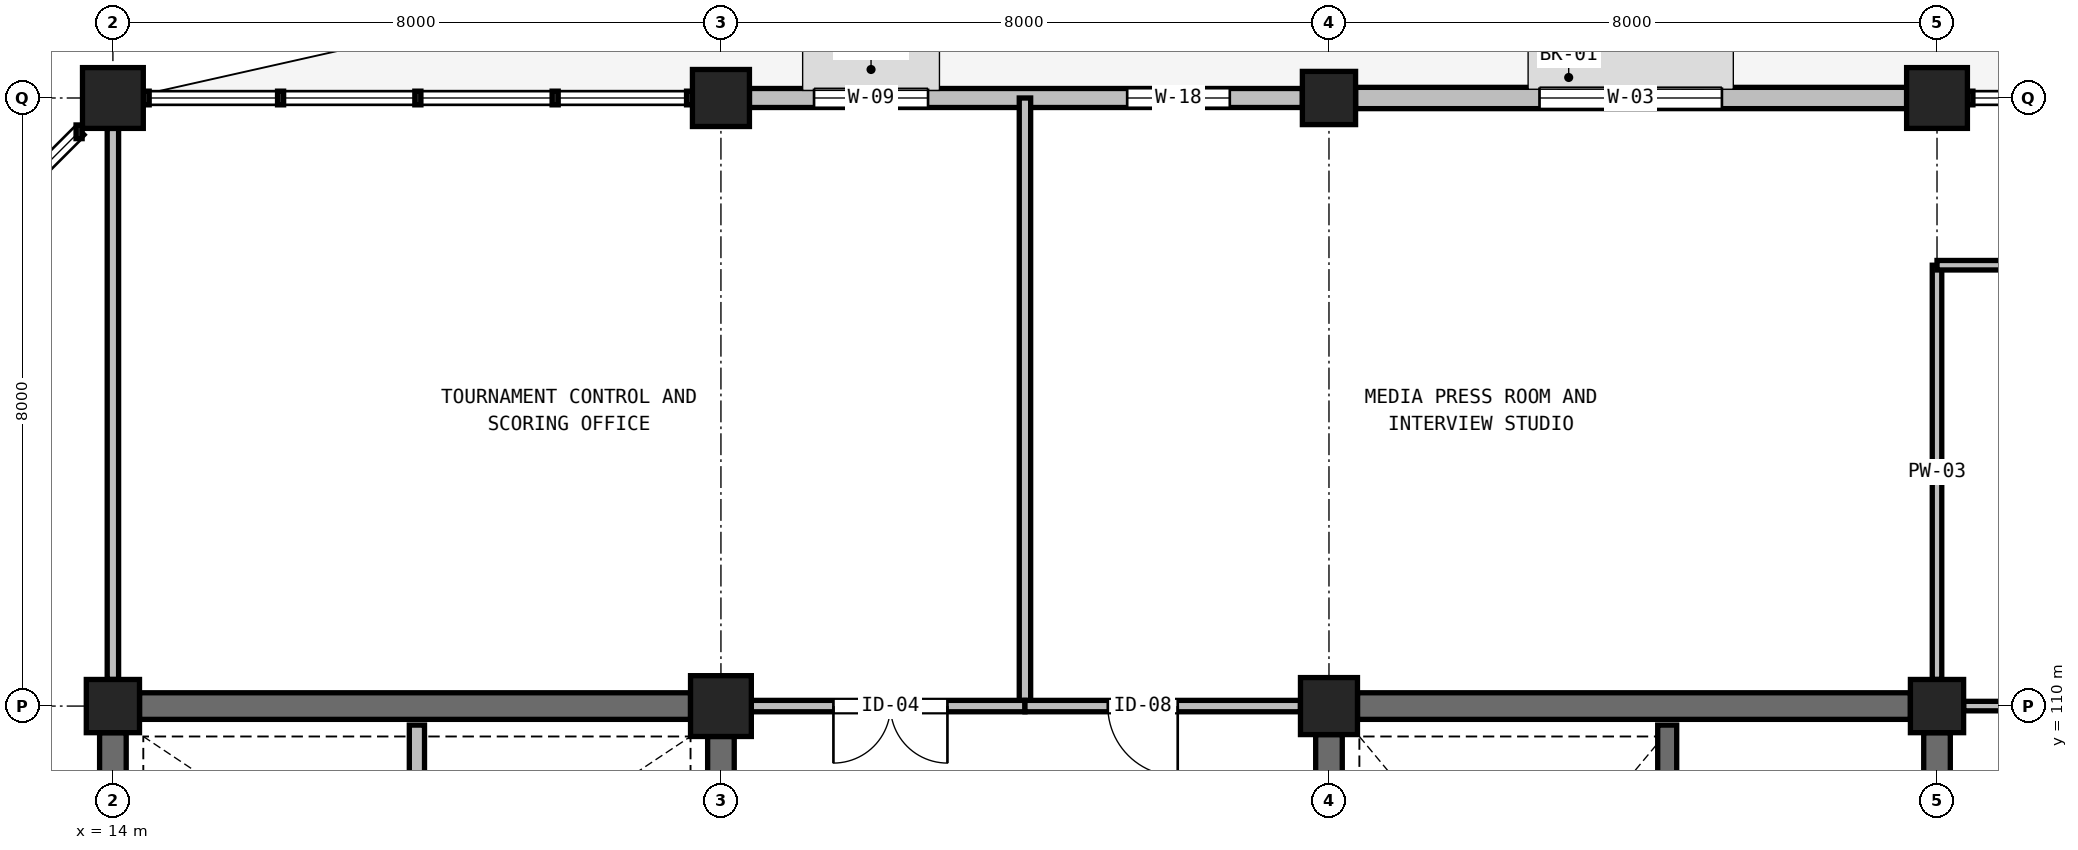
"""IFC4 building model, lengths in metres.
Left out: names, types, materials, properties, quantities, classifications, styles, units other than length and angle.
Written with IfcOpenShell. Run it as: python <this file> out.ifc"""

import sys

from ifc_helpers import new_model, si_unit, direction, frame, frame_2d, origin, origin_2d, place, context, subcontext, project, spatial, rectangle, extrude, element, fill, save


model = new_model("IFC4")
c1 = context("Model", 3, precision=1e-05, world=origin(), true_north=direction((0.0, 1.0)))
c2 = subcontext(c1, "Body", "Model", "MODEL_VIEW")
j1 = project(units=[si_unit("LENGTHUNIT", "METRE"), si_unit("PLANEANGLEUNIT", "RADIAN")], contexts=[c1])
p1 = place(None, origin())
s1 = spatial("IfcSite", under=j1, at=p1, CompositionType="ELEMENT")
p2 = place(p1, origin())
s2 = spatial("IfcBuilding", under=s1, at=p2, CompositionType="ELEMENT")
p3 = place(p2, frame((0.0, 0.0, 5.4)))
s3 = spatial("IfcBuildingStorey", under=s2, at=p3, CompositionType="ELEMENT", Elevation=5.4)
p4 = place(p3, frame((14.0, 110.0, 0.0), z_axis=(0.0, 0.0, 1.0), x_axis=(1.0, 0.0, 0.0)))
e1 = element("IfcColumn", 1, at=p4, inside=s3, PredefinedType="COLUMN", context=c2, shape_type="SweptSolid", body=[
    extrude(rectangle(XDim=0.7, YDim=0.7, at=origin_2d()), origin(), (0.0, 0.0, 1.0), 5.4),
])
for number, where, z_axis, x_axis in (
    (2, (14.0, 118.0, 0.0), (0.0, 0.0, 1.0), (1.0, 0.0, 0.0)),
    (3, (22.0, 110.0, 0.0), (0.0, 0.0, 1.0), (1.0, 0.0, 0.0)),
):
    element("IfcColumn", number, at=place(p3, frame(where, z_axis=z_axis, x_axis=x_axis)), inside=s3, PredefinedType="COLUMN", context=c2, shape_type="SweptSolid", body=[
        extrude(rectangle(XDim=0.8, YDim=0.8, at=origin_2d()), origin(), (0.0, 0.0, 1.0), 5.4),
    ])
for number, where, z_axis, x_axis in (
    (4, (22.0, 118.0, 0.0), (0.0, 0.0, 1.0), (1.0, 0.0, 0.0)),
    (5, (30.0, 110.0, 0.0), (0.0, 0.0, 1.0), (1.0, 0.0, 0.0)),
):
    element("IfcColumn", number, at=place(p3, frame(where, z_axis=z_axis, x_axis=x_axis)), inside=s3, PredefinedType="COLUMN", context=c2, shape_type="SweptSolid", body=[
        extrude(rectangle(XDim=0.75, YDim=0.75, at=origin_2d()), origin(), (0.0, 0.0, 1.0), 5.4),
    ])
for number, where, z_axis, x_axis in (
    (6, (30.0, 118.0, 0.0), (0.0, 0.0, 1.0), (1.0, 0.0, 0.0)),
    (7, (38.0, 110.0, 0.0), (0.0, 0.0, 1.0), (1.0, 0.0, 0.0)),
):
    element("IfcColumn", number, at=place(p3, frame(where, z_axis=z_axis, x_axis=x_axis)), inside=s3, PredefinedType="COLUMN", context=c2, shape_type="SweptSolid", body=[
        extrude(rectangle(XDim=0.7, YDim=0.7, at=origin_2d()), origin(), (0.0, 0.0, 1.0), 5.4),
    ])
p5 = place(p3, frame((38.0, 118.0, 0.0), z_axis=(0.0, 0.0, 1.0), x_axis=(1.0, 0.0, 0.0)))
e8 = element("IfcColumn", 8, at=p5, inside=s3, PredefinedType="COLUMN", context=c2, shape_type="SweptSolid", body=[
    extrude(rectangle(XDim=0.8, YDim=0.8, at=origin_2d()), origin(), (0.0, 0.0, 1.0), 5.4),
])
p6 = place(p3, frame((22.375, 118.0, 0.0), z_axis=(0.0, 0.0, 1.0), x_axis=(1.0, 0.0, 0.0)))
e9 = element("IfcWall", 9, at=p6, inside=s3, PredefinedType="SOLIDWALL", context=c2, shape_type="SweptSolid", body=[
    extrude(rectangle(XDim=7.275, YDim=0.25, at=frame_2d((3.637, 0.0))), origin(), (0.0, 0.0, 1.0), 4.14),
])
p7 = place(p6, frame((0.85, 0.0, 1.2)))
e10 = element("IfcOpeningElement", 10, at=p7, cuts=e9, PredefinedType="OPENING", context=c2, shape_type="SweptSolid", body=[
    extrude(rectangle(XDim=1.5, YDim=1.5, at=frame_2d((0.75, 0.75))), frame((0.0, 0.135, 0.0), z_axis=(0.0, -1.0, 0.0), x_axis=(1.0, 0.0, 0.0)), (0.0, 0.0, 1.0), 0.27),
])
p8 = place(p6, frame((4.97, 0.0, 1.05)))
e11 = element("IfcOpeningElement", 11, at=p8, cuts=e9, PredefinedType="OPENING", context=c2, shape_type="SweptSolid", body=[
    extrude(rectangle(XDim=1.35, YDim=1.65, at=frame_2d((0.675, 0.825))), frame((0.0, 0.135, 0.0), z_axis=(0.0, -1.0, 0.0), x_axis=(1.0, 0.0, 0.0)), (0.0, 0.0, 1.0), 0.27),
])
p9 = place(p3, frame((30.35, 118.0, 0.0), z_axis=(0.0, 0.0, 1.0), x_axis=(1.0, 0.0, 0.0)))
e12 = element("IfcWall", 12, at=p9, inside=s3, PredefinedType="SOLIDWALL", context=c2, shape_type="SweptSolid", body=[
    extrude(rectangle(XDim=7.25, YDim=0.28, at=frame_2d((3.625, 0.0))), origin(), (0.0, 0.0, 1.0), 4.04),
])
p10 = place(p9, frame((2.42, 0.0, 0.9)))
e13 = element("IfcOpeningElement", 13, at=p10, cuts=e12, PredefinedType="OPENING", context=c2, shape_type="SweptSolid", body=[
    extrude(rectangle(XDim=2.4, YDim=1.8, at=frame_2d((1.2, 0.9))), frame((0.0, 0.15, 0.0), z_axis=(0.0, -1.0, 0.0), x_axis=(1.0, 0.0, 0.0)), (0.0, 0.0, 1.0), 0.3),
])
p11 = place(p3, frame((14.35, 110.0, 0.0), z_axis=(0.0, 0.0, 1.0), x_axis=(1.0, 0.0, 0.0)))
e14 = element("IfcWall", 14, at=p11, inside=s3, PredefinedType="SHEAR", context=c2, shape_type="SweptSolid", body=[
    extrude(rectangle(XDim=7.25, YDim=0.35, at=frame_2d((3.625, 0.0))), origin(), (0.0, 0.0, 1.0), 5.18),
])
p12 = place(p3, frame((14.0, 102.375, 0.0), z_axis=(0.0, 0.0, 1.0), x_axis=(0.0, 1.0, 0.0)))
e15 = element("IfcWall", 15, at=p12, inside=s3, PredefinedType="SHEAR", context=c2, shape_type="SweptSolid", body=[
    extrude(rectangle(XDim=7.275, YDim=0.35, at=frame_2d((3.637, 0.0))), origin(), (0.0, 0.0, 1.0), 5.18),
])
p13 = place(p3, frame((22.0, 102.35, 0.0), z_axis=(0.0, 0.0, 1.0), x_axis=(0.0, 1.0, 0.0)))
e16 = element("IfcWall", 16, at=p13, inside=s3, PredefinedType="SHEAR", context=c2, shape_type="SweptSolid", body=[
    extrude(rectangle(XDim=7.25, YDim=0.35, at=frame_2d((3.625, 0.0))), origin(), (0.0, 0.0, 1.0), 5.18),
])
p14 = place(p13, frame((0.35, 0.0, 0.0)))
e17 = element("IfcOpeningElement", 17, at=p14, cuts=e16, PredefinedType="OPENING", context=c2, shape_type="SweptSolid", body=[
    extrude(rectangle(XDim=1.8, YDim=2.2, at=frame_2d((0.9, 1.1))), frame((0.0, 0.185, 0.0), z_axis=(0.0, -1.0, 0.0), x_axis=(1.0, 0.0, 0.0)), (0.0, 0.0, 1.0), 0.37),
])
p15 = place(p3, frame((18.0, 105.35, 0.0), z_axis=(0.0, 0.0, 1.0), x_axis=(0.0, 1.0, 0.0)))
e18 = element("IfcWall", 18, at=p15, inside=s3, PredefinedType="PARTITIONING", context=c2, shape_type="SweptSolid", body=[
    extrude(rectangle(XDim=4.4, YDim=0.2, at=frame_2d((2.2, 0.0))), origin(), (0.0, 0.0, 1.0), 5.1),
])
p16 = place(p3, frame((30.375, 110.0, 0.0), z_axis=(0.0, 0.0, 1.0), x_axis=(1.0, 0.0, 0.0)))
e19 = element("IfcWall", 19, at=p16, inside=s3, PredefinedType="SHEAR", context=c2, shape_type="SweptSolid", body=[
    extrude(rectangle(XDim=7.275, YDim=0.35, at=frame_2d((3.637, 0.0))), origin(), (0.0, 0.0, 1.0), 5.18),
])
p17 = place(p3, frame((30.0, 102.4, 0.0), z_axis=(0.0, 0.0, 1.0), x_axis=(0.0, 1.0, 0.0)))
e20 = element("IfcWall", 20, at=p17, inside=s3, PredefinedType="SHEAR", context=c2, shape_type="SweptSolid", body=[
    extrude(rectangle(XDim=7.225, YDim=0.35, at=frame_2d((3.613, 0.0))), origin(), (0.0, 0.0, 1.0), 5.18),
])
p18 = place(p17, frame((0.35, 0.0, 0.0)))
e21 = element("IfcOpeningElement", 21, at=p18, cuts=e20, PredefinedType="OPENING", context=c2, shape_type="SweptSolid", body=[
    extrude(rectangle(XDim=1.8, YDim=2.2, at=frame_2d((0.9, 1.1))), frame((0.0, 0.185, 0.0), z_axis=(0.0, -1.0, 0.0), x_axis=(1.0, 0.0, 0.0)), (0.0, 0.0, 1.0), 0.37),
])
p19 = place(p3, frame((38.0, 102.375, 0.0), z_axis=(0.0, 0.0, 1.0), x_axis=(0.0, 1.0, 0.0)))
e22 = element("IfcWall", 22, at=p19, inside=s3, PredefinedType="SHEAR", context=c2, shape_type="SweptSolid", body=[
    extrude(rectangle(XDim=7.275, YDim=0.35, at=frame_2d((3.637, 0.0))), origin(), (0.0, 0.0, 1.0), 5.18),
])
p20 = place(p3, frame((34.45, 105.2, 0.0), z_axis=(0.0, 0.0, 1.0), x_axis=(0.0, 1.0, 0.0)))
e23 = element("IfcWall", 23, at=p20, inside=s3, PredefinedType="SOLIDWALL", context=c2, shape_type="SweptSolid", body=[
    extrude(rectangle(XDim=4.55, YDim=0.25, at=frame_2d((2.275, 0.0))), origin(), (0.0, 0.0, 1.0), 5.18),
])
p21 = place(p3, frame((14.0, 110.35, 0.0), z_axis=(0.0, 0.0, 1.0), x_axis=(0.0, 1.0, 0.0)))
e24 = element("IfcWall", 24, at=p21, inside=s3, PredefinedType="PARTITIONING", context=c2, shape_type="SweptSolid", body=[
    extrude(rectangle(XDim=7.25, YDim=0.15, at=frame_2d((3.625, 0.0))), origin(), (0.0, 0.0, 1.0), 4.39),
])
p22 = place(p3, frame((26.0, 110.0, 0.0), z_axis=(0.0, 0.0, 1.0), x_axis=(0.0, 1.0, 0.0)))
e25 = element("IfcWall", 25, at=p22, inside=s3, PredefinedType="PARTITIONING", context=c2, shape_type="SweptSolid", body=[
    extrude(rectangle(XDim=8.0, YDim=0.15, at=frame_2d((4.0, 0.0))), origin(), (0.0, 0.0, 1.0), 5.1),
])
p23 = place(p3, frame((38.0, 110.35, 0.0), z_axis=(0.0, 0.0, 1.0), x_axis=(0.0, 1.0, 0.0)))
e26 = element("IfcWall", 26, at=p23, inside=s3, PredefinedType="PARTITIONING", context=c2, shape_type="SweptSolid", body=[
    extrude(rectangle(XDim=5.45, YDim=0.125, at=frame_2d((2.725, 0.0))), origin(), (0.0, 0.0, 1.0), 4.54),
])
p24 = place(p3, frame((22.4, 110.0, 0.0), z_axis=(0.0, 0.0, 1.0), x_axis=(1.0, 0.0, 0.0)))
e27 = element("IfcWall", 27, at=p24, inside=s3, PredefinedType="PARTITIONING", context=c2, shape_type="SweptSolid", body=[
    extrude(rectangle(XDim=3.6, YDim=0.15, at=frame_2d((1.8, 0.0))), origin(), (0.0, 0.0, 1.0), 4.34),
])
p25 = place(p24, frame((1.08, 0.0, 0.0)))
e28 = element("IfcOpeningElement", 28, at=p25, cuts=e27, PredefinedType="OPENING", context=c2, shape_type="SweptSolid", body=[
    extrude(rectangle(XDim=1.5, YDim=2.2, at=frame_2d((0.75, 1.1))), frame((0.0, 0.085, 0.0), z_axis=(0.0, -1.0, 0.0), x_axis=(1.0, 0.0, 0.0)), (0.0, 0.0, 1.0), 0.17),
])
p26 = place(p3, frame((26.0, 110.0, 0.0), z_axis=(0.0, 0.0, 1.0), x_axis=(1.0, 0.0, 0.0)))
e29 = element("IfcWall", 29, at=p26, inside=s3, PredefinedType="PARTITIONING", context=c2, shape_type="SweptSolid", body=[
    extrude(rectangle(XDim=3.625, YDim=0.15, at=frame_2d((1.812, 0.0))), origin(), (0.0, 0.0, 1.0), 4.34),
])
p27 = place(p26, frame((1.09, 0.0, 0.0)))
e30 = element("IfcOpeningElement", 30, at=p27, cuts=e29, PredefinedType="OPENING", context=c2, shape_type="SweptSolid", body=[
    extrude(rectangle(XDim=0.92, YDim=2.12, at=frame_2d((0.46, 1.06))), frame((0.0, 0.085, 0.0), z_axis=(0.0, -1.0, 0.0), x_axis=(1.0, 0.0, 0.0)), (0.0, 0.0, 1.0), 0.17),
])
p28 = place(p3, frame((38.35, 110.0, 0.0), z_axis=(0.0, 0.0, 1.0), x_axis=(1.0, 0.0, 0.0)))
e31 = element("IfcWall", 31, at=p28, inside=s3, PredefinedType="PARTITIONING", context=c2, shape_type="SweptSolid", body=[
    extrude(rectangle(XDim=7.25, YDim=0.125, at=frame_2d((3.625, 0.0))), origin(), (0.0, 0.0, 1.0), 4.42),
])
p29 = place(p28, frame((2.54, 0.0, 0.0)))
e32 = element("IfcOpeningElement", 32, at=p29, cuts=e31, PredefinedType="OPENING", context=c2, shape_type="SweptSolid", body=[
    extrude(rectangle(XDim=0.95, YDim=2.1, at=frame_2d((0.475, 1.05))), frame((0.0, 0.073, 0.0), z_axis=(0.0, -1.0, 0.0), x_axis=(1.0, 0.0, 0.0)), (0.0, 0.0, 1.0), 0.145),
])
p30 = place(p3, frame((38.0, 115.8, 0.0), z_axis=(0.0, 0.0, 1.0), x_axis=(1.0, 0.0, 0.0)))
e33 = element("IfcWall", 33, at=p30, inside=s3, PredefinedType="PARTITIONING", context=c2, shape_type="SweptSolid", body=[
    extrude(rectangle(XDim=8.0, YDim=0.125, at=frame_2d((4.0, 0.0))), origin(), (0.0, 0.0, 1.0), 5.1),
])
p31 = place(p7, origin())
e34 = element("IfcWindow", 34, at=p31, inside=s3, PartitioningType="SINGLE_PANEL", PredefinedType="WINDOW", context=c2, shape_type="SweptSolid", body=[
    extrude(rectangle(XDim=1.5, YDim=1.5, at=frame_2d((0.75, 0.75))), frame((0.0, 0.03, 0.0), z_axis=(0.0, -1.0, 0.0), x_axis=(1.0, 0.0, 0.0)), (0.0, 0.0, 1.0), 0.06),
])
fill(e10, e34)
p32 = place(p8, origin())
e35 = element("IfcWindow", 35, at=p32, inside=s3, PartitioningType="SINGLE_PANEL", PredefinedType="WINDOW", context=c2, shape_type="SweptSolid", body=[
    extrude(rectangle(XDim=1.35, YDim=1.65, at=frame_2d((0.675, 0.825))), frame((0.0, 0.03, 0.0), z_axis=(0.0, -1.0, 0.0), x_axis=(1.0, 0.0, 0.0)), (0.0, 0.0, 1.0), 0.06),
])
fill(e11, e35)
p33 = place(p10, origin())
e36 = element("IfcWindow", 36, at=p33, inside=s3, PartitioningType="SINGLE_PANEL", PredefinedType="WINDOW", context=c2, shape_type="SweptSolid", body=[
    extrude(rectangle(XDim=2.4, YDim=1.8, at=frame_2d((1.2, 0.9))), frame((0.0, 0.03, 0.0), z_axis=(0.0, -1.0, 0.0), x_axis=(1.0, 0.0, 0.0)), (0.0, 0.0, 1.0), 0.06),
])
fill(e13, e36)
p34 = place(p25, frame((1.5, 0.0, 0.0), z_axis=(0.0, 0.0, 1.0), x_axis=(-1.0, 0.0, 0.0)))
e37 = element("IfcDoor", 37, at=p34, inside=s3, OperationType="DOUBLE_DOOR_SINGLE_SWING", PredefinedType="DOOR", context=c2, shape_type="SweptSolid", body=[
    extrude(rectangle(XDim=1.5, YDim=2.2, at=frame_2d((0.75, 1.1))), frame((0.0, 0.025, 0.0), z_axis=(0.0, -1.0, 0.0), x_axis=(1.0, 0.0, 0.0)), (0.0, 0.0, 1.0), 0.05),
])
fill(e28, e37)
p35 = place(p27, frame((0.92, 0.0, 0.0), z_axis=(0.0, 0.0, 1.0), x_axis=(-1.0, 0.0, 0.0)))
e38 = element("IfcDoor", 38, at=p35, inside=s3, OperationType="SINGLE_SWING_RIGHT", PredefinedType="DOOR", context=c2, shape_type="SweptSolid", body=[
    extrude(rectangle(XDim=0.92, YDim=2.12, at=frame_2d((0.46, 1.06))), frame((0.0, 0.025, 0.0), z_axis=(0.0, -1.0, 0.0), x_axis=(1.0, 0.0, 0.0)), (0.0, 0.0, 1.0), 0.05),
])
fill(e30, e38)
save(model, sys.argv[1])
